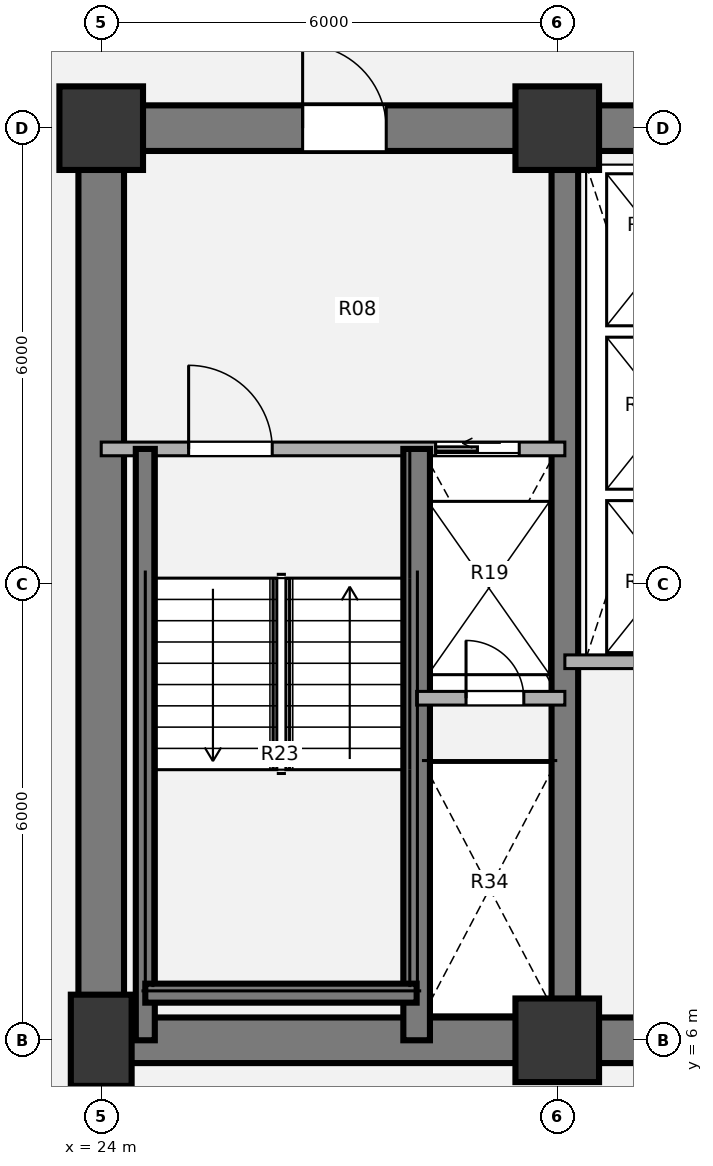
"""IFC4 building model, lengths in metres.
Left out: names, types, materials, properties, quantities, classifications, styles, units other than length and angle.
Written with IfcOpenShell. Run it as: python <this file> out.ifc"""

import sys

from ifc_helpers import new_model, si_unit, direction, frame, frame_2d, origin, origin_2d, place, context, subcontext, project, spatial, rectangle, extrude, source, transform, mapped, element, fill, save


model = new_model("IFC4")
c1 = context("Model", 3, precision=1e-05, world=origin(), true_north=direction((0.0, 1.0)))
c2 = subcontext(c1, "Body", "Model", "MODEL_VIEW")
j1 = project(units=[si_unit("LENGTHUNIT", "METRE"), si_unit("PLANEANGLEUNIT", "RADIAN")], contexts=[c1])
p1 = place(None, origin())
s1 = spatial("IfcSite", under=j1, at=p1, CompositionType="ELEMENT")
p2 = place(p1, origin())
s2 = spatial("IfcBuilding", under=s1, at=p2, CompositionType="ELEMENT")
p3 = place(p2, frame((0.0, 0.0, 53.46)))
s3 = spatial("IfcBuildingStorey", under=s2, at=p3, CompositionType="ELEMENT", Elevation=53.46)
m1 = source(origin(), c2, "Body", "SweptSolid", [
    extrude(rectangle(XDim=0.8, YDim=1.2, at=origin_2d()), origin(), (0.0, 0.0, 1.0), 3.78),
])
p4 = place(p3, frame((24.0, 6.0, 0.0), z_axis=(0.0, 0.0, 1.0), x_axis=(1.0, 0.0, 0.0)))
e1 = element("IfcColumn", 1, at=p4, inside=s3, PredefinedType="COLUMN", context=c2, shape_type="MappedRepresentation", body=[
    mapped(m1, transform((0.0, 0.0, 0.0), x_axis=(1.0, 0.0, 0.0), y_axis=(0.0, 1.0, 0.0), z_axis=(0.0, 0.0, 1.0), scale=1.0)),
])
m2 = source(origin(), c2, "Body", "SweptSolid", [
    extrude(rectangle(XDim=1.1, YDim=1.1, at=origin_2d()), origin(), (0.0, 0.0, 1.0), 3.78),
])
for number, where, z_axis, x_axis in (
    (2, (30.0, 6.0, 0.0), (0.0, 0.0, 1.0), (1.0, 0.0, 0.0)),
    (3, (24.0, 18.0, 0.0), (0.0, 0.0, 1.0), (1.0, 0.0, 0.0)),
    (4, (30.0, 18.0, 0.0), (0.0, 0.0, 1.0), (1.0, 0.0, 0.0)),
):
    element("IfcColumn", number, at=place(p3, frame(where, z_axis=z_axis, x_axis=x_axis)), inside=s3, PredefinedType="COLUMN", context=c2, shape_type="MappedRepresentation", body=[
        mapped(m2, transform((0.0, 0.0, 0.0), x_axis=(1.0, 0.0, 0.0), y_axis=(0.0, 1.0, 0.0), z_axis=(0.0, 0.0, 1.0), scale=1.0)),
    ])
p5 = place(p3, frame((48.3, 6.0, 0.0), z_axis=(0.0, 0.0, 1.0), x_axis=(-1.0, 0.0, 0.0)))
e5 = element("IfcWall", 5, at=p5, inside=s3, PredefinedType="SHEAR", context=c2, shape_type="SweptSolid", body=[
    extrude(rectangle(XDim=24.6, YDim=0.6, at=frame_2d((12.3, 0.0))), origin(), (0.0, 0.0, 1.0), 3.78),
])
p6 = place(p3, frame((24.0, 6.0, 0.0), z_axis=(0.0, 0.0, 1.0), x_axis=(0.0, 1.0, 0.0)))
e6 = element("IfcWall", 6, at=p6, inside=s3, PredefinedType="SHEAR", context=c2, shape_type="SweptSolid", body=[
    extrude(rectangle(XDim=12.0, YDim=0.6, at=frame_2d((6.0, 0.0))), origin(), (0.0, 0.0, 1.0), 3.78),
])
p7 = place(p3, frame((23.7, 18.0, 0.0), z_axis=(0.0, 0.0, 1.0), x_axis=(1.0, 0.0, 0.0)))
e7 = element("IfcWall", 7, at=p7, inside=s3, PredefinedType="SHEAR", context=c2, shape_type="SweptSolid", body=[
    extrude(rectangle(XDim=9.5, YDim=0.6, at=frame_2d((4.75, 0.0))), origin(), (0.0, 0.0, 1.0), 3.78),
])
p8 = place(p7, frame((2.95, 0.0, 0.0)))
e8 = element("IfcOpeningElement", 8, at=p8, cuts=e7, PredefinedType="OPENING", context=c2, shape_type="SweptSolid", body=[
    extrude(rectangle(XDim=1.1, YDim=2.1, at=origin_2d()), frame((0.55, 0.31, 1.05), z_axis=(0.0, -1.0, 0.0), x_axis=(1.0, 0.0, 0.0)), (0.0, 0.0, 1.0), 0.62),
])
p9 = place(p3, frame((30.1, 6.0, 0.0), z_axis=(0.0, 0.0, 1.0), x_axis=(0.0, 1.0, 0.0)))
e9 = element("IfcWall", 9, at=p9, inside=s3, PredefinedType="SHEAR", context=c2, shape_type="SweptSolid", body=[
    extrude(rectangle(XDim=12.0, YDim=0.35, at=frame_2d((6.0, 0.0))), origin(), (0.0, 0.0, 1.0), 3.78),
])
p10 = place(p3, frame((30.1, 10.98, 0.0), z_axis=(0.0, 0.0, 1.0), x_axis=(1.0, 0.0, 0.0)))
e10 = element("IfcWall", 10, at=p10, inside=s3, PredefinedType="PARTITIONING", context=c2, shape_type="SweptSolid", body=[
    extrude(rectangle(XDim=4.08, YDim=0.18, at=frame_2d((2.04, 0.0))), origin(), (0.0, 0.0, 1.0), 3.5),
])
p11 = place(p3, frame((24.0, 13.78, 0.0), z_axis=(0.0, 0.0, 1.0), x_axis=(1.0, 0.0, 0.0)))
e11 = element("IfcWall", 11, at=p11, inside=s3, PredefinedType="PARTITIONING", context=c2, shape_type="SweptSolid", body=[
    extrude(rectangle(XDim=6.1, YDim=0.18, at=frame_2d((3.05, 0.0))), origin(), (0.0, 0.0, 1.0), 3.5),
])
p12 = place(p11, frame((1.15, 0.0, 0.0)))
e12 = element("IfcOpeningElement", 12, at=p12, cuts=e11, PredefinedType="OPENING", context=c2, shape_type="SweptSolid", body=[
    extrude(rectangle(XDim=1.1, YDim=2.1, at=origin_2d()), frame((0.55, 0.1, 1.05), z_axis=(0.0, -1.0, 0.0), x_axis=(1.0, 0.0, 0.0)), (0.0, 0.0, 1.0), 0.2),
])
p13 = place(p11, frame((4.4, 0.0, 0.0)))
e13 = element("IfcOpeningElement", 13, at=p13, cuts=e11, PredefinedType="OPENING", context=c2, shape_type="SweptSolid", body=[
    extrude(rectangle(XDim=1.1, YDim=2.1, at=origin_2d()), frame((0.55, 0.1, 1.05), z_axis=(0.0, -1.0, 0.0), x_axis=(1.0, 0.0, 0.0)), (0.0, 0.0, 1.0), 0.2),
])
p14 = place(p3, frame((28.15, 6.0, 0.0), z_axis=(0.0, 0.0, 1.0), x_axis=(0.0, 1.0, 0.0)))
e14 = element("IfcWall", 14, at=p14, inside=s3, PredefinedType="SHEAR", context=c2, shape_type="SweptSolid", body=[
    extrude(rectangle(XDim=7.78, YDim=0.35, at=frame_2d((3.89, 0.0))), origin(), (0.0, 0.0, 1.0), 3.85),
])
p15 = place(p3, frame((24.58, 6.0, 0.0), z_axis=(0.0, 0.0, 1.0), x_axis=(0.0, 1.0, 0.0)))
e15 = element("IfcWall", 15, at=p15, inside=s3, PredefinedType="SHEAR", context=c2, shape_type="SweptSolid", body=[
    extrude(rectangle(XDim=7.78, YDim=0.25, at=frame_2d((3.89, 0.0))), origin(), (0.0, 0.0, 1.0), 3.85),
])
p16 = place(p3, frame((24.58, 6.62, 0.0), z_axis=(0.0, 0.0, 1.0), x_axis=(1.0, 0.0, 0.0)))
e16 = element("IfcWall", 16, at=p16, inside=s3, PredefinedType="SHEAR", context=c2, shape_type="SweptSolid", body=[
    extrude(rectangle(XDim=3.57, YDim=0.25, at=frame_2d((1.785, 0.0))), origin(), (0.0, 0.0, 1.0), 3.85),
])
p17 = place(p3, frame((28.15, 10.5, 0.0), z_axis=(0.0, 0.0, 1.0), x_axis=(1.0, 0.0, 0.0)))
e17 = element("IfcWall", 17, at=p17, inside=s3, PredefinedType="PARTITIONING", context=c2, shape_type="SweptSolid", body=[
    extrude(rectangle(XDim=1.95, YDim=0.18, at=frame_2d((0.975, 0.0))), origin(), (0.0, 0.0, 1.0), 3.5),
])
p18 = place(p17, frame((0.65, 0.0, 0.0)))
e18 = element("IfcOpeningElement", 18, at=p18, cuts=e17, PredefinedType="OPENING", context=c2, shape_type="SweptSolid", body=[
    extrude(rectangle(XDim=0.76, YDim=2.05, at=origin_2d()), frame((0.38, 0.1, 1.025), z_axis=(0.0, -1.0, 0.0), x_axis=(1.0, 0.0, 0.0)), (0.0, 0.0, 1.0), 0.2),
])
m3 = source(origin(), c2, "Body", "SweptSolid", [
    extrude(rectangle(XDim=1.1, YDim=2.1, at=origin_2d()), frame((0.55, 0.025, 1.05), z_axis=(0.0, -1.0, 0.0), x_axis=(1.0, 0.0, 0.0)), (0.0, 0.0, 1.0), 0.05),
])
p19 = place(p12, origin())
e19 = element("IfcDoor", 19, at=p19, inside=s3, OperationType="SINGLE_SWING_LEFT", PredefinedType="DOOR", context=c2, shape_type="MappedRepresentation", body=[
    mapped(m3, transform((0.0, 0.0, 0.0), x_axis=(1.0, 0.0, 0.0), y_axis=(0.0, 1.0, 0.0), z_axis=(0.0, 0.0, 1.0), scale=1.0)),
])
fill(e12, e19)
m4 = source(origin(), c2, "Body", "SweptSolid", [
    extrude(rectangle(XDim=1.1, YDim=2.1, at=origin_2d()), frame((0.55, 0.025, 1.05), z_axis=(0.0, -1.0, 0.0), x_axis=(1.0, 0.0, 0.0)), (0.0, 0.0, 1.0), 0.05),
])
p20 = place(p13, origin())
e20 = element("IfcDoor", 20, at=p20, inside=s3, OperationType="SLIDING_TO_LEFT", PredefinedType="DOOR", context=c2, shape_type="MappedRepresentation", body=[
    mapped(m4, transform((0.0, 0.0, 0.0), x_axis=(1.0, 0.0, 0.0), y_axis=(0.0, 1.0, 0.0), z_axis=(0.0, 0.0, 1.0), scale=1.0)),
])
fill(e13, e20)
m5 = source(origin(), c2, "Body", "SweptSolid", [
    extrude(rectangle(XDim=0.76, YDim=2.05, at=origin_2d()), frame((0.38, 0.025, 1.025), z_axis=(0.0, -1.0, 0.0), x_axis=(1.0, 0.0, 0.0)), (0.0, 0.0, 1.0), 0.05),
])
p21 = place(p18, origin())
e21 = element("IfcDoor", 21, at=p21, inside=s3, OperationType="SINGLE_SWING_LEFT", PredefinedType="DOOR", context=c2, shape_type="MappedRepresentation", body=[
    mapped(m5, transform((0.0, 0.0, 0.0), x_axis=(1.0, 0.0, 0.0), y_axis=(0.0, 1.0, 0.0), z_axis=(0.0, 0.0, 1.0), scale=1.0)),
])
fill(e18, e21)
m6 = source(origin(), c2, "Body", "SweptSolid", [
    extrude(rectangle(XDim=1.1, YDim=2.1, at=origin_2d()), frame((0.55, 0.025, 1.05), z_axis=(0.0, -1.0, 0.0), x_axis=(1.0, 0.0, 0.0)), (0.0, 0.0, 1.0), 0.05),
])
p22 = place(p8, origin())
e22 = element("IfcDoor", 22, at=p22, inside=s3, OperationType="SINGLE_SWING_LEFT", PredefinedType="DOOR", context=c2, shape_type="MappedRepresentation", body=[
    mapped(m6, transform((0.0, 0.0, 0.0), x_axis=(1.0, 0.0, 0.0), y_axis=(0.0, 1.0, 0.0), z_axis=(0.0, 0.0, 1.0), scale=1.0)),
])
fill(e8, e22)
save(model, sys.argv[1])
